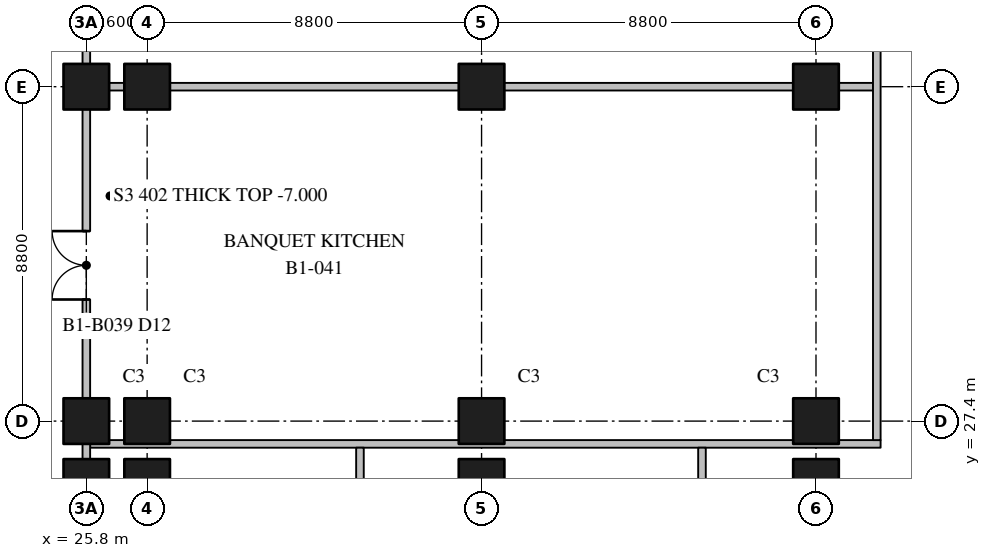
"""IFC4 building model, lengths in metres.
Left out: names, types, materials, properties, quantities, classifications, styles, units other than length and angle.
Written with IfcOpenShell. Run it as: python <this file> out.ifc"""

import sys

from ifc_helpers import new_model, si_unit, direction, frame, frame_2d, origin, origin_2d, place, context, subcontext, project, spatial, rectangle, extrude, element, fill, save


model = new_model("IFC4")
c1 = context("Model", 3, precision=1e-05, world=origin(), true_north=direction((0.0, 1.0)))
c2 = subcontext(c1, "Body", "Model", "MODEL_VIEW")
j1 = project(units=[si_unit("LENGTHUNIT", "METRE"), si_unit("PLANEANGLEUNIT", "RADIAN")], contexts=[c1])
p1 = place(None, origin())
s1 = spatial("IfcSite", under=j1, at=p1, CompositionType="ELEMENT")
p2 = place(p1, origin())
s2 = spatial("IfcBuilding", under=s1, at=p2, CompositionType="ELEMENT")
p3 = place(p2, frame((0.0, 0.0, -7.0)))
s3 = spatial("IfcBuildingStorey", under=s2, at=p3, CompositionType="ELEMENT", Elevation=-7.0)
for number, where, z_axis, x_axis in (
    (1, (25.8, 25.8, 0.0), (0.0, 0.0, 1.0), (1.0, 0.0, 0.0)),
    (2, (25.8, 27.4, 0.0), (0.0, 0.0, 1.0), (1.0, 0.0, 0.0)),
    (3, (25.8, 36.2, 0.0), (0.0, 0.0, 1.0), (1.0, 0.0, 0.0)),
    (4, (27.4, 25.8, 0.0), (0.0, 0.0, 1.0), (1.0, 0.0, 0.0)),
    (5, (27.4, 27.4, 0.0), (0.0, 0.0, 1.0), (1.0, 0.0, 0.0)),
    (6, (27.4, 36.2, 0.0), (0.0, 0.0, 1.0), (1.0, 0.0, 0.0)),
    (7, (36.2, 25.8, 0.0), (0.0, 0.0, 1.0), (1.0, 0.0, 0.0)),
    (8, (36.2, 27.4, 0.0), (0.0, 0.0, 1.0), (1.0, 0.0, 0.0)),
    (9, (36.2, 36.2, 0.0), (0.0, 0.0, 1.0), (1.0, 0.0, 0.0)),
    (10, (45.0, 25.8, 0.0), (0.0, 0.0, 1.0), (1.0, 0.0, 0.0)),
    (11, (45.0, 27.4, 0.0), (0.0, 0.0, 1.0), (1.0, 0.0, 0.0)),
    (12, (45.0, 36.2, 0.0), (0.0, 0.0, 1.0), (1.0, 0.0, 0.0)),
):
    element("IfcColumn", number, at=place(p3, frame(where, z_axis=z_axis, x_axis=x_axis)), inside=s3, PredefinedType="COLUMN", context=c2, shape_type="SweptSolid", body=[
        extrude(rectangle(XDim=1.2, YDim=1.2, at=origin_2d()), origin(), (0.0, 0.0, 1.0), 7.0),
    ])
p4 = place(p3, frame((25.9, 26.8, 0.0), z_axis=(0.0, 0.0, 1.0), x_axis=(1.0, 0.0, 0.0)))
e13 = element("IfcWall", 13, at=p4, inside=s3, PredefinedType="PARTITIONING", context=c2, shape_type="SweptSolid", body=[
    extrude(rectangle(XDim=20.8, YDim=0.2, at=frame_2d((10.4, 0.0))), origin(), (0.0, 0.0, 1.0), 6.5),
])
p5 = place(p3, frame((25.9, 36.2, 0.0), z_axis=(0.0, 0.0, 1.0), x_axis=(1.0, 0.0, 0.0)))
e14 = element("IfcWall", 14, at=p5, inside=s3, PredefinedType="PARTITIONING", context=c2, shape_type="SweptSolid", body=[
    extrude(rectangle(XDim=20.6, YDim=0.2, at=frame_2d((10.3, 0.0))), origin(), (0.0, 0.0, 1.0), 6.5),
])
p6 = place(p3, frame((25.8, 12.3, 0.0), z_axis=(0.0, 0.0, 1.0), x_axis=(0.0, 1.0, 0.0)))
e15 = element("IfcWall", 15, at=p6, inside=s3, PredefinedType="PARTITIONING", context=c2, shape_type="SweptSolid", body=[
    extrude(rectangle(XDim=63.8, YDim=0.2, at=frame_2d((31.9, 0.0))), origin(), (0.0, 0.0, 1.0), 6.5),
])
p7 = place(p6, frame((18.3, 0.0, 0.0)))
e16 = element("IfcOpeningElement", 16, at=p7, cuts=e15, PredefinedType="OPENING", context=c2, shape_type="SweptSolid", body=[
    extrude(rectangle(XDim=1.8, YDim=2.1, at=frame_2d((0.9, 1.05))), frame((0.0, 0.11, 0.0), z_axis=(0.0, -1.0, 0.0), x_axis=(1.0, 0.0, 0.0)), (0.0, 0.0, 1.0), 0.22),
])
p8 = place(p6, frame((27.4, 0.0, 0.0)))
e17 = element("IfcOpeningElement", 17, at=p8, cuts=e15, PredefinedType="OPENING", context=c2, shape_type="SweptSolid", body=[
    extrude(rectangle(XDim=1.8, YDim=2.1, at=frame_2d((0.9, 1.05))), frame((0.0, 0.11, 0.0), z_axis=(0.0, -1.0, 0.0), x_axis=(1.0, 0.0, 0.0)), (0.0, 0.0, 1.0), 0.22),
])
p9 = place(p6, frame((36.2, 0.0, 0.0)))
e18 = element("IfcOpeningElement", 18, at=p9, cuts=e15, PredefinedType="OPENING", context=c2, shape_type="SweptSolid", body=[
    extrude(rectangle(XDim=1.8, YDim=2.1, at=frame_2d((0.9, 1.05))), frame((0.0, 0.11, 0.0), z_axis=(0.0, -1.0, 0.0), x_axis=(1.0, 0.0, 0.0)), (0.0, 0.0, 1.0), 0.22),
])
p10 = place(p6, frame((42.9, 0.0, 0.0)))
e19 = element("IfcOpeningElement", 19, at=p10, cuts=e15, PredefinedType="OPENING", context=c2, shape_type="SweptSolid", body=[
    extrude(rectangle(XDim=1.0, YDim=2.1, at=frame_2d((0.5, 1.05))), frame((0.0, 0.11, 0.0), z_axis=(0.0, -1.0, 0.0), x_axis=(1.0, 0.0, 0.0)), (0.0, 0.0, 1.0), 0.22),
])
p11 = place(p6, frame((51.2, 0.0, 0.0)))
e20 = element("IfcOpeningElement", 20, at=p11, cuts=e15, PredefinedType="OPENING", context=c2, shape_type="SweptSolid", body=[
    extrude(rectangle(XDim=1.8, YDim=2.1, at=frame_2d((0.9, 1.05))), frame((0.0, 0.11, 0.0), z_axis=(0.0, -1.0, 0.0), x_axis=(1.0, 0.0, 0.0)), (0.0, 0.0, 1.0), 0.22),
])
p12 = place(p6, frame((60.5, 0.0, 0.0)))
e21 = element("IfcOpeningElement", 21, at=p12, cuts=e15, PredefinedType="OPENING", context=c2, shape_type="SweptSolid", body=[
    extrude(rectangle(XDim=1.0, YDim=2.1, at=frame_2d((0.5, 1.05))), frame((0.0, 0.11, 0.0), z_axis=(0.0, -1.0, 0.0), x_axis=(1.0, 0.0, 0.0)), (0.0, 0.0, 1.0), 0.22),
])
p13 = place(p3, frame((42.0, 19.8, 0.0), z_axis=(0.0, 0.0, 1.0), x_axis=(0.0, 1.0, 0.0)))
e22 = element("IfcWall", 22, at=p13, inside=s3, PredefinedType="PARTITIONING", context=c2, shape_type="SweptSolid", body=[
    extrude(rectangle(XDim=6.9, YDim=0.2, at=frame_2d((3.45, 0.0))), origin(), (0.0, 0.0, 1.0), 6.5),
])
p14 = place(p3, frame((46.6, 26.9, 0.0), z_axis=(0.0, 0.0, 1.0), x_axis=(0.0, 1.0, 0.0)))
e23 = element("IfcWall", 23, at=p14, inside=s3, PredefinedType="PARTITIONING", context=c2, shape_type="SweptSolid", body=[
    extrude(rectangle(XDim=18.0, YDim=0.2, at=frame_2d((9.0, 0.0))), origin(), (0.0, 0.0, 1.0), 6.5),
])
p15 = place(p3, frame((33.0, 12.3, 0.0), z_axis=(0.0, 0.0, 1.0), x_axis=(0.0, 1.0, 0.0)))
e24 = element("IfcWall", 24, at=p15, inside=s3, PredefinedType="PARTITIONING", context=c2, shape_type="SweptSolid", body=[
    extrude(rectangle(XDim=14.4, YDim=0.2, at=frame_2d((7.2, 0.0))), origin(), (0.0, 0.0, 1.0), 6.5),
])
p16 = place(p15, frame((2.8, 0.0, 0.0)))
e25 = element("IfcOpeningElement", 25, at=p16, cuts=e24, PredefinedType="OPENING", context=c2, shape_type="SweptSolid", body=[
    extrude(rectangle(XDim=1.0, YDim=2.1, at=frame_2d((0.5, 1.05))), frame((0.0, 0.11, 0.0), z_axis=(0.0, -1.0, 0.0), x_axis=(1.0, 0.0, 0.0)), (0.0, 0.0, 1.0), 0.22),
])
p17 = place(p15, frame((10.1, 0.0, 0.0)))
e26 = element("IfcOpeningElement", 26, at=p17, cuts=e24, PredefinedType="OPENING", context=c2, shape_type="SweptSolid", body=[
    extrude(rectangle(XDim=1.0, YDim=2.1, at=frame_2d((0.5, 1.05))), frame((0.0, 0.11, 0.0), z_axis=(0.0, -1.0, 0.0), x_axis=(1.0, 0.0, 0.0)), (0.0, 0.0, 1.0), 0.22),
])
p18 = place(p7, origin())
e27 = element("IfcDoor", 27, at=p18, inside=s3, OperationType="DOUBLE_DOOR_SINGLE_SWING", PredefinedType="DOOR", context=c2, shape_type="SweptSolid", body=[
    extrude(rectangle(XDim=1.8, YDim=2.1, at=frame_2d((0.9, 1.05))), frame((0.0, 0.025, 0.0), z_axis=(0.0, -1.0, 0.0), x_axis=(1.0, 0.0, 0.0)), (0.0, 0.0, 1.0), 0.05),
])
fill(e16, e27)
save(model, sys.argv[1])
